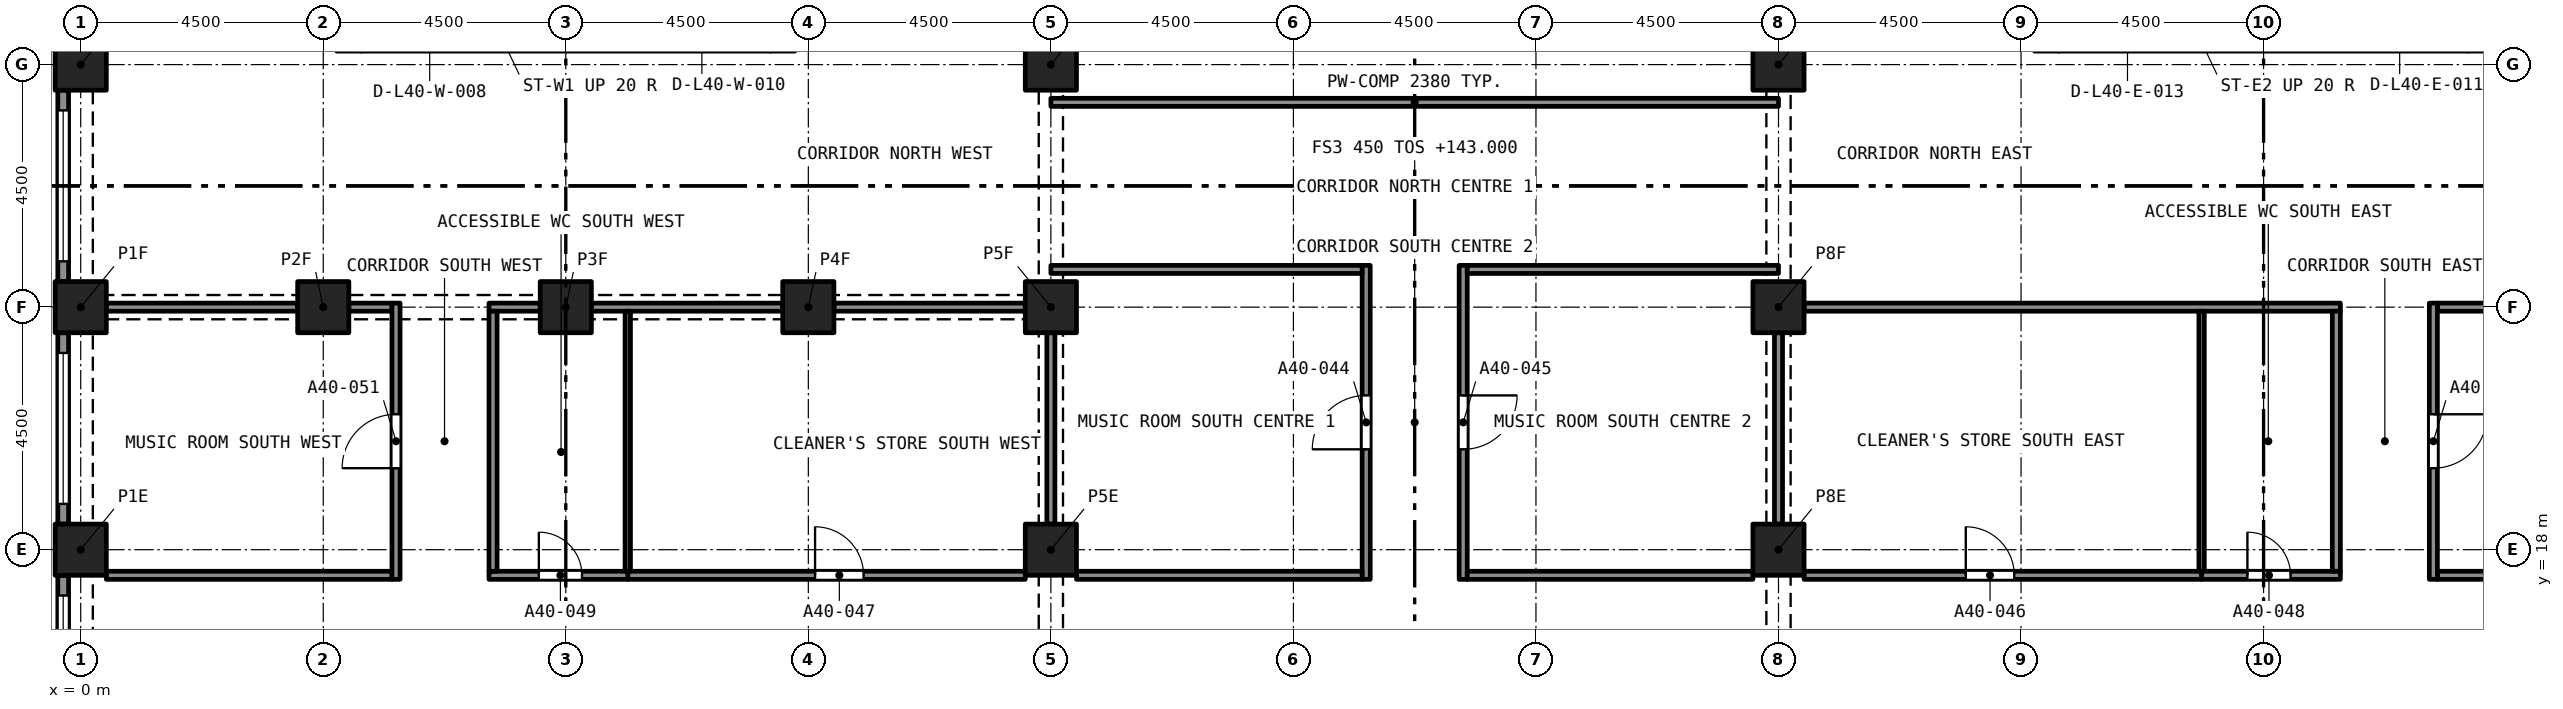
"""IFC4 building model, lengths in metres.
Left out: names, types, materials, properties, quantities, classifications, styles, units other than length and angle.
Written with IfcOpenShell. Run it as: python <this file> out.ifc"""

import sys

from ifc_helpers import new_model, si_unit, direction, frame, frame_2d, origin, origin_2d, place, context, subcontext, project, spatial, rectangle, extrude, element, fill, save


model = new_model("IFC4")
c1 = context("Model", 3, precision=1e-05, world=origin(), true_north=direction((0.0, 1.0)))
c2 = subcontext(c1, "Body", "Model", "MODEL_VIEW")
j1 = project(units=[si_unit("LENGTHUNIT", "METRE"), si_unit("PLANEANGLEUNIT", "RADIAN")], contexts=[c1])
p1 = place(None, origin())
s1 = spatial("IfcSite", under=j1, at=p1, CompositionType="ELEMENT")
p2 = place(p1, origin())
s2 = spatial("IfcBuilding", under=s1, at=p2, CompositionType="ELEMENT")
p3 = place(p2, frame((0.0, 0.0, 143.0)))
s3 = spatial("IfcBuildingStorey", under=s2, at=p3, CompositionType="ELEMENT", Elevation=143.0)
for number, where, z_axis, x_axis in (
    (1, (0.0, 18.0, 0.0), (0.0, 0.0, 1.0), (1.0, 0.0, 0.0)),
    (2, (18.0, 18.0, 0.0), (0.0, 0.0, 1.0), (1.0, 0.0, 0.0)),
    (3, (31.5, 18.0, 0.0), (0.0, 0.0, 1.0), (1.0, 0.0, 0.0)),
    (4, (0.0, 22.5, 0.0), (0.0, 0.0, 1.0), (1.0, 0.0, 0.0)),
    (5, (4.5, 22.5, 0.0), (0.0, 0.0, 1.0), (1.0, 0.0, 0.0)),
    (6, (9.0, 22.5, 0.0), (0.0, 0.0, 1.0), (1.0, 0.0, 0.0)),
    (7, (13.5, 22.5, 0.0), (0.0, 0.0, 1.0), (1.0, 0.0, 0.0)),
    (8, (18.0, 22.5, 0.0), (0.0, 0.0, 1.0), (1.0, 0.0, 0.0)),
    (9, (31.5, 22.5, 0.0), (0.0, 0.0, 1.0), (1.0, 0.0, 0.0)),
    (10, (0.0, 27.0, 0.0), (0.0, 0.0, 1.0), (1.0, 0.0, 0.0)),
    (11, (18.0, 27.0, 0.0), (0.0, 0.0, 1.0), (1.0, 0.0, 0.0)),
    (12, (31.5, 27.0, 0.0), (0.0, 0.0, 1.0), (1.0, 0.0, 0.0)),
):
    element("IfcColumn", number, at=place(p3, frame(where, z_axis=z_axis, x_axis=x_axis)), inside=s3, PredefinedType="COLUMN", context=c2, shape_type="SweptSolid", body=[
        extrude(rectangle(XDim=0.95, YDim=0.95, at=origin_2d()), origin(), (0.0, 0.0, 1.0), 3.2),
    ])
p4 = place(p3, frame((-0.325, 22.975, 0.0), z_axis=(0.0, 0.0, 1.0), x_axis=(0.0, 1.0, 0.0)))
e13 = element("IfcWall", 13, at=p4, inside=s3, PredefinedType="SOLIDWALL", context=c2, shape_type="SweptSolid", body=[
    extrude(rectangle(XDim=3.55, YDim=0.2, at=frame_2d((1.775, 0.0))), origin(), (0.0, 0.0, 1.0), 3.2),
])
p5 = place(p4, frame((0.375, 0.0, 0.45)))
e14 = element("IfcOpeningElement", 14, at=p5, cuts=e13, PredefinedType="OPENING", context=c2, shape_type="SweptSolid", body=[
    extrude(rectangle(XDim=2.8, YDim=1.95, at=frame_2d((1.4, 0.975))), frame((0.0, 0.11, 0.0), z_axis=(0.0, -1.0, 0.0), x_axis=(1.0, 0.0, 0.0)), (0.0, 0.0, 1.0), 0.22),
])
p6 = place(p3, frame((-0.325, 18.475, 0.0), z_axis=(0.0, 0.0, 1.0), x_axis=(0.0, 1.0, 0.0)))
e15 = element("IfcWall", 15, at=p6, inside=s3, PredefinedType="SOLIDWALL", context=c2, shape_type="SweptSolid", body=[
    extrude(rectangle(XDim=3.55, YDim=0.2, at=frame_2d((1.775, 0.0))), origin(), (0.0, 0.0, 1.0), 3.2),
])
p7 = place(p6, frame((0.375, 0.0, 0.45)))
e16 = element("IfcOpeningElement", 16, at=p7, cuts=e15, PredefinedType="OPENING", context=c2, shape_type="SweptSolid", body=[
    extrude(rectangle(XDim=2.8, YDim=1.95, at=frame_2d((1.4, 0.975))), frame((0.0, 0.11, 0.0), z_axis=(0.0, -1.0, 0.0), x_axis=(1.0, 0.0, 0.0)), (0.0, 0.0, 1.0), 0.22),
])
p8 = place(p3, frame((-0.325, 13.975, 0.0), z_axis=(0.0, 0.0, 1.0), x_axis=(0.0, 1.0, 0.0)))
e17 = element("IfcWall", 17, at=p8, inside=s3, PredefinedType="SOLIDWALL", context=c2, shape_type="SweptSolid", body=[
    extrude(rectangle(XDim=3.55, YDim=0.2, at=frame_2d((1.775, 0.0))), origin(), (0.0, 0.0, 1.0), 3.2),
])
p9 = place(p8, frame((0.375, 0.0, 0.45)))
e18 = element("IfcOpeningElement", 18, at=p9, cuts=e17, PredefinedType="OPENING", context=c2, shape_type="SweptSolid", body=[
    extrude(rectangle(XDim=2.8, YDim=1.95, at=frame_2d((1.4, 0.975))), frame((0.0, 0.11, 0.0), z_axis=(0.0, -1.0, 0.0), x_axis=(1.0, 0.0, 0.0)), (0.0, 0.0, 1.0), 0.22),
])
p10 = place(p3, frame((23.85, 17.45, 0.0), z_axis=(0.0, 0.0, 1.0), x_axis=(0.0, 1.0, 0.0)))
e19 = element("IfcWall", 19, at=p10, inside=s3, PredefinedType="PARTITIONING", context=c2, shape_type="SweptSolid", body=[
    extrude(rectangle(XDim=5.825, YDim=0.15, at=frame_2d((2.913, 0.0))), origin(), (0.0, 0.0, 1.0), 2.75),
])
p11 = place(p10, frame((2.413, 0.0, 0.0)))
e20 = element("IfcOpeningElement", 20, at=p11, cuts=e19, PredefinedType="OPENING", context=c2, shape_type="SweptSolid", body=[
    extrude(rectangle(XDim=1.0, YDim=2.1, at=frame_2d((0.5, 1.05))), frame((0.0, 0.085, 0.0), z_axis=(0.0, -1.0, 0.0), x_axis=(1.0, 0.0, 0.0)), (0.0, 0.0, 1.0), 0.17),
])
p12 = place(p3, frame((25.65, 23.275, 0.0), z_axis=(0.0, 0.0, 1.0), x_axis=(0.0, -1.0, 0.0)))
e21 = element("IfcWall", 21, at=p12, inside=s3, PredefinedType="PARTITIONING", context=c2, shape_type="SweptSolid", body=[
    extrude(rectangle(XDim=5.825, YDim=0.15, at=frame_2d((2.913, 0.0))), origin(), (0.0, 0.0, 1.0), 2.75),
])
p13 = place(p12, frame((2.413, 0.0, 0.0)))
e22 = element("IfcOpeningElement", 22, at=p13, cuts=e21, PredefinedType="OPENING", context=c2, shape_type="SweptSolid", body=[
    extrude(rectangle(XDim=1.0, YDim=2.1, at=frame_2d((0.5, 1.05))), frame((0.0, 0.085, 0.0), z_axis=(0.0, -1.0, 0.0), x_axis=(1.0, 0.0, 0.0)), (0.0, 0.0, 1.0), 0.17),
])
for number, where, z_axis, x_axis in (
    (23, (18.475, 17.525, 0.0), (0.0, 0.0, 1.0), (1.0, 0.0, 0.0)),
    (24, (25.725, 17.525, 0.0), (0.0, 0.0, 1.0), (1.0, 0.0, 0.0)),
):
    element("IfcWall", number, at=place(p3, frame(where, z_axis=z_axis, x_axis=x_axis)), inside=s3, PredefinedType="PARTITIONING", context=c2, shape_type="SweptSolid", body=[
        extrude(rectangle(XDim=5.3, YDim=0.15, at=frame_2d((2.65, 0.0))), origin(), (0.0, 0.0, 1.0), 2.75),
    ])
p14 = place(p3, frame((31.975, 17.525, 0.0), z_axis=(0.0, 0.0, 1.0), x_axis=(1.0, 0.0, 0.0)))
e25 = element("IfcWall", 25, at=p14, inside=s3, PredefinedType="PARTITIONING", context=c2, shape_type="SweptSolid", body=[
    extrude(rectangle(XDim=7.375, YDim=0.15, at=frame_2d((3.688, 0.0))), origin(), (0.0, 0.0, 1.0), 2.9),
])
p15 = place(p14, frame((3.0, 0.0, 0.0)))
e26 = element("IfcOpeningElement", 26, at=p15, cuts=e25, PredefinedType="OPENING", context=c2, shape_type="SweptSolid", body=[
    extrude(rectangle(XDim=0.9, YDim=2.1, at=frame_2d((0.45, 1.05))), frame((0.0, 0.085, 0.0), z_axis=(0.0, -1.0, 0.0), x_axis=(1.0, 0.0, 0.0)), (0.0, 0.0, 1.0), 0.17),
])
p16 = place(p3, frame((10.15, 17.525, 0.0), z_axis=(0.0, 0.0, 1.0), x_axis=(1.0, 0.0, 0.0)))
e27 = element("IfcWall", 27, at=p16, inside=s3, PredefinedType="PARTITIONING", context=c2, shape_type="SweptSolid", body=[
    extrude(rectangle(XDim=7.375, YDim=0.15, at=frame_2d((3.688, 0.0))), origin(), (0.0, 0.0, 1.0), 2.9),
])
p17 = place(p16, frame((3.475, 0.0, 0.0)))
e28 = element("IfcOpeningElement", 28, at=p17, cuts=e27, PredefinedType="OPENING", context=c2, shape_type="SweptSolid", body=[
    extrude(rectangle(XDim=0.9, YDim=2.1, at=frame_2d((0.45, 1.05))), frame((0.0, 0.085, 0.0), z_axis=(0.0, -1.0, 0.0), x_axis=(1.0, 0.0, 0.0)), (0.0, 0.0, 1.0), 0.17),
])
p18 = place(p3, frame((39.35, 17.525, 0.0), z_axis=(0.0, 0.0, 1.0), x_axis=(1.0, 0.0, 0.0)))
e29 = element("IfcWall", 29, at=p18, inside=s3, PredefinedType="PARTITIONING", context=c2, shape_type="SweptSolid", body=[
    extrude(rectangle(XDim=2.575, YDim=0.15, at=frame_2d((1.288, 0.0))), origin(), (0.0, 0.0, 1.0), 2.9),
])
p19 = place(p18, frame((0.85, 0.0, 0.0)))
e30 = element("IfcOpeningElement", 30, at=p19, cuts=e29, PredefinedType="OPENING", context=c2, shape_type="SweptSolid", body=[
    extrude(rectangle(XDim=0.8, YDim=2.1, at=frame_2d((0.4, 1.05))), frame((0.0, 0.085, 0.0), z_axis=(0.0, -1.0, 0.0), x_axis=(1.0, 0.0, 0.0)), (0.0, 0.0, 1.0), 0.17),
])
p20 = place(p3, frame((7.575, 17.525, 0.0), z_axis=(0.0, 0.0, 1.0), x_axis=(1.0, 0.0, 0.0)))
e31 = element("IfcWall", 31, at=p20, inside=s3, PredefinedType="PARTITIONING", context=c2, shape_type="SweptSolid", body=[
    extrude(rectangle(XDim=2.575, YDim=0.15, at=frame_2d((1.288, 0.0))), origin(), (0.0, 0.0, 1.0), 2.9),
])
p21 = place(p20, frame((0.925, 0.0, 0.0)))
e32 = element("IfcOpeningElement", 32, at=p21, cuts=e31, PredefinedType="OPENING", context=c2, shape_type="SweptSolid", body=[
    extrude(rectangle(XDim=0.8, YDim=2.1, at=frame_2d((0.4, 1.05))), frame((0.0, 0.085, 0.0), z_axis=(0.0, -1.0, 0.0), x_axis=(1.0, 0.0, 0.0)), (0.0, 0.0, 1.0), 0.17),
])
for number, where, z_axis, x_axis in (
    (33, (43.725, 17.525, 0.0), (0.0, 0.0, 1.0), (1.0, 0.0, 0.0)),
    (34, (0.475, 17.525, 0.0), (0.0, 0.0, 1.0), (1.0, 0.0, 0.0)),
):
    element("IfcWall", number, at=place(p3, frame(where, z_axis=z_axis, x_axis=x_axis)), inside=s3, PredefinedType="PARTITIONING", context=c2, shape_type="SweptSolid", body=[
        extrude(rectangle(XDim=5.3, YDim=0.15, at=frame_2d((2.65, 0.0))), origin(), (0.0, 0.0, 1.0), 2.9),
    ])
p22 = place(p3, frame((18.0, 26.3, 0.0), z_axis=(0.0, 0.0, 1.0), x_axis=(1.0, 0.0, 0.0)))
e35 = element("IfcWall", 35, at=p22, inside=s3, PredefinedType="PARTITIONING", context=c2, shape_type="SweptSolid", body=[
    extrude(rectangle(XDim=13.5, YDim=0.15, at=frame_2d((6.75, 0.0))), origin(), (0.0, 0.0, 1.0), 2.38),
])
p23 = place(p3, frame((18.0, 23.2, 0.0), z_axis=(0.0, 0.0, 1.0), x_axis=(1.0, 0.0, 0.0)))
e36 = element("IfcWall", 36, at=p23, inside=s3, PredefinedType="PARTITIONING", context=c2, shape_type="SweptSolid", body=[
    extrude(rectangle(XDim=5.775, YDim=0.15, at=frame_2d((2.887, 0.0))), origin(), (0.0, 0.0, 1.0), 2.75),
])
p24 = place(p3, frame((18.0, 18.475, 0.0), z_axis=(0.0, 0.0, 1.0), x_axis=(0.0, 1.0, 0.0)))
e37 = element("IfcWall", 37, at=p24, inside=s3, PredefinedType="PARTITIONING", context=c2, shape_type="SweptSolid", body=[
    extrude(rectangle(XDim=3.55, YDim=0.15, at=frame_2d((1.775, 0.0))), origin(), (0.0, 0.0, 1.0), 2.38),
])
p25 = place(p3, frame((25.725, 23.2, 0.0), z_axis=(0.0, 0.0, 1.0), x_axis=(1.0, 0.0, 0.0)))
e38 = element("IfcWall", 38, at=p25, inside=s3, PredefinedType="PARTITIONING", context=c2, shape_type="SweptSolid", body=[
    extrude(rectangle(XDim=5.775, YDim=0.15, at=frame_2d((2.887, 0.0))), origin(), (0.0, 0.0, 1.0), 2.75),
])
p26 = place(p3, frame((31.5, 18.475, 0.0), z_axis=(0.0, 0.0, 1.0), x_axis=(0.0, 1.0, 0.0)))
e39 = element("IfcWall", 39, at=p26, inside=s3, PredefinedType="PARTITIONING", context=c2, shape_type="SweptSolid", body=[
    extrude(rectangle(XDim=3.55, YDim=0.15, at=frame_2d((1.775, 0.0))), origin(), (0.0, 0.0, 1.0), 2.38),
])
p27 = place(p3, frame((31.975, 22.5, 0.0), z_axis=(0.0, 0.0, 1.0), x_axis=(1.0, 0.0, 0.0)))
e40 = element("IfcWall", 40, at=p27, inside=s3, PredefinedType="PARTITIONING", context=c2, shape_type="SweptSolid", body=[
    extrude(rectangle(XDim=9.95, YDim=0.15, at=frame_2d((4.975, 0.0))), origin(), (0.0, 0.0, 1.0), 2.9),
])
p28 = place(p3, frame((43.725, 22.5, 0.0), z_axis=(0.0, 0.0, 1.0), x_axis=(1.0, 0.0, 0.0)))
e41 = element("IfcWall", 41, at=p28, inside=s3, PredefinedType="PARTITIONING", context=c2, shape_type="SweptSolid", body=[
    extrude(rectangle(XDim=5.3, YDim=0.15, at=frame_2d((2.65, 0.0))), origin(), (0.0, 0.0, 1.0), 2.9),
])
for number, where, z_axis, x_axis in (
    (42, (13.975, 22.5, 0.0), (0.0, 0.0, 1.0), (1.0, 0.0, 0.0)),
    (43, (9.475, 22.5, 0.0), (0.0, 0.0, 1.0), (1.0, 0.0, 0.0)),
):
    element("IfcWall", number, at=place(p3, frame(where, z_axis=z_axis, x_axis=x_axis)), inside=s3, PredefinedType="PARTITIONING", context=c2, shape_type="SweptSolid", body=[
        extrude(rectangle(XDim=3.55, YDim=0.15, at=frame_2d((1.775, 0.0))), origin(), (0.0, 0.0, 1.0), 2.38),
    ])
p29 = place(p3, frame((7.575, 22.5, 0.0), z_axis=(0.0, 0.0, 1.0), x_axis=(1.0, 0.0, 0.0)))
e44 = element("IfcWall", 44, at=p29, inside=s3, PredefinedType="PARTITIONING", context=c2, shape_type="SweptSolid", body=[
    extrude(rectangle(XDim=0.95, YDim=0.15, at=frame_2d((0.475, 0.0))), origin(), (0.0, 0.0, 1.0), 2.38),
])
p30 = place(p3, frame((4.975, 22.5, 0.0), z_axis=(0.0, 0.0, 1.0), x_axis=(1.0, 0.0, 0.0)))
e45 = element("IfcWall", 45, at=p30, inside=s3, PredefinedType="PARTITIONING", context=c2, shape_type="SweptSolid", body=[
    extrude(rectangle(XDim=0.8, YDim=0.15, at=frame_2d((0.4, 0.0))), origin(), (0.0, 0.0, 1.0), 2.38),
])
p31 = place(p3, frame((0.475, 22.5, 0.0), z_axis=(0.0, 0.0, 1.0), x_axis=(1.0, 0.0, 0.0)))
e46 = element("IfcWall", 46, at=p31, inside=s3, PredefinedType="PARTITIONING", context=c2, shape_type="SweptSolid", body=[
    extrude(rectangle(XDim=3.55, YDim=0.15, at=frame_2d((1.775, 0.0))), origin(), (0.0, 0.0, 1.0), 2.38),
])
p32 = place(p3, frame((41.85, 17.6, 0.0), z_axis=(0.0, 0.0, 1.0), x_axis=(0.0, 1.0, 0.0)))
e47 = element("IfcWall", 47, at=p32, inside=s3, PredefinedType="PARTITIONING", context=c2, shape_type="SweptSolid", body=[
    extrude(rectangle(XDim=4.825, YDim=0.15, at=frame_2d((2.413, 0.0))), origin(), (0.0, 0.0, 1.0), 2.9),
])
p33 = place(p3, frame((43.65, 22.575, 0.0), z_axis=(0.0, 0.0, 1.0), x_axis=(0.0, -1.0, 0.0)))
e48 = element("IfcWall", 48, at=p33, inside=s3, PredefinedType="PARTITIONING", context=c2, shape_type="SweptSolid", body=[
    extrude(rectangle(XDim=5.125, YDim=0.15, at=frame_2d((2.562, 0.0))), origin(), (0.0, 0.0, 1.0), 2.9),
])
p34 = place(p33, frame((2.062, 0.0, 0.0)))
e49 = element("IfcOpeningElement", 49, at=p34, cuts=e48, PredefinedType="OPENING", context=c2, shape_type="SweptSolid", body=[
    extrude(rectangle(XDim=1.0, YDim=2.1, at=frame_2d((0.5, 1.05))), frame((0.0, 0.085, 0.0), z_axis=(0.0, -1.0, 0.0), x_axis=(1.0, 0.0, 0.0)), (0.0, 0.0, 1.0), 0.17),
])
p35 = place(p3, frame((7.65, 17.6, 0.0), z_axis=(0.0, 0.0, 1.0), x_axis=(0.0, 1.0, 0.0)))
e50 = element("IfcWall", 50, at=p35, inside=s3, PredefinedType="PARTITIONING", context=c2, shape_type="SweptSolid", body=[
    extrude(rectangle(XDim=4.825, YDim=0.15, at=frame_2d((2.413, 0.0))), origin(), (0.0, 0.0, 1.0), 2.9),
])
p36 = place(p3, frame((5.85, 17.45, 0.0), z_axis=(0.0, 0.0, 1.0), x_axis=(0.0, 1.0, 0.0)))
e51 = element("IfcWall", 51, at=p36, inside=s3, PredefinedType="PARTITIONING", context=c2, shape_type="SweptSolid", body=[
    extrude(rectangle(XDim=5.125, YDim=0.15, at=frame_2d((2.562, 0.0))), origin(), (0.0, 0.0, 1.0), 2.9),
])
p37 = place(p36, frame((2.062, 0.0, 0.0)))
e52 = element("IfcOpeningElement", 52, at=p37, cuts=e51, PredefinedType="OPENING", context=c2, shape_type="SweptSolid", body=[
    extrude(rectangle(XDim=1.0, YDim=2.1, at=frame_2d((0.5, 1.05))), frame((0.0, 0.085, 0.0), z_axis=(0.0, -1.0, 0.0), x_axis=(1.0, 0.0, 0.0)), (0.0, 0.0, 1.0), 0.17),
])
for number, where, z_axis, x_axis in (
    (53, (39.35, 17.6, 0.0), (0.0, 0.0, 1.0), (0.0, 1.0, 0.0)),
    (54, (10.15, 17.6, 0.0), (0.0, 0.0, 1.0), (0.0, 1.0, 0.0)),
):
    element("IfcWall", number, at=place(p3, frame(where, z_axis=z_axis, x_axis=x_axis)), inside=s3, PredefinedType="PARTITIONING", context=c2, shape_type="SweptSolid", body=[
        extrude(rectangle(XDim=4.825, YDim=0.1, at=frame_2d((2.413, 0.0))), origin(), (0.0, 0.0, 1.0), 2.9),
    ])
p38 = place(p5, origin())
e55 = element("IfcWindow", 55, at=p38, inside=s3, PartitioningType="SINGLE_PANEL", PredefinedType="WINDOW", context=c2, shape_type="SweptSolid", body=[
    extrude(rectangle(XDim=2.8, YDim=1.95, at=frame_2d((1.4, 0.975))), frame((0.0, 0.03, 0.0), z_axis=(0.0, -1.0, 0.0), x_axis=(1.0, 0.0, 0.0)), (0.0, 0.0, 1.0), 0.06),
])
fill(e14, e55)
p39 = place(p7, origin())
e56 = element("IfcWindow", 56, at=p39, inside=s3, PartitioningType="SINGLE_PANEL", PredefinedType="WINDOW", context=c2, shape_type="SweptSolid", body=[
    extrude(rectangle(XDim=2.8, YDim=1.95, at=frame_2d((1.4, 0.975))), frame((0.0, 0.03, 0.0), z_axis=(0.0, -1.0, 0.0), x_axis=(1.0, 0.0, 0.0)), (0.0, 0.0, 1.0), 0.06),
])
fill(e16, e56)
p40 = place(p9, origin())
e57 = element("IfcWindow", 57, at=p40, inside=s3, PartitioningType="SINGLE_PANEL", PredefinedType="WINDOW", context=c2, shape_type="SweptSolid", body=[
    extrude(rectangle(XDim=2.8, YDim=1.95, at=frame_2d((1.4, 0.975))), frame((0.0, 0.03, 0.0), z_axis=(0.0, -1.0, 0.0), x_axis=(1.0, 0.0, 0.0)), (0.0, 0.0, 1.0), 0.06),
])
fill(e18, e57)
p41 = place(p11, origin())
e58 = element("IfcDoor", 58, at=p41, inside=s3, OperationType="SINGLE_SWING_LEFT", PredefinedType="DOOR", context=c2, shape_type="SweptSolid", body=[
    extrude(rectangle(XDim=1.0, YDim=2.1, at=frame_2d((0.5, 1.05))), frame((0.0, 0.025, 0.0), z_axis=(0.0, -1.0, 0.0), x_axis=(1.0, 0.0, 0.0)), (0.0, 0.0, 1.0), 0.05),
])
fill(e20, e58)
p42 = place(p13, origin())
e59 = element("IfcDoor", 59, at=p42, inside=s3, OperationType="SINGLE_SWING_RIGHT", PredefinedType="DOOR", context=c2, shape_type="SweptSolid", body=[
    extrude(rectangle(XDim=1.0, YDim=2.1, at=frame_2d((0.5, 1.05))), frame((0.0, 0.025, 0.0), z_axis=(0.0, -1.0, 0.0), x_axis=(1.0, 0.0, 0.0)), (0.0, 0.0, 1.0), 0.05),
])
fill(e22, e59)
p43 = place(p15, origin())
e60 = element("IfcDoor", 60, at=p43, inside=s3, OperationType="SINGLE_SWING_LEFT", PredefinedType="DOOR", context=c2, shape_type="SweptSolid", body=[
    extrude(rectangle(XDim=0.9, YDim=2.1, at=frame_2d((0.45, 1.05))), frame((0.0, 0.025, 0.0), z_axis=(0.0, -1.0, 0.0), x_axis=(1.0, 0.0, 0.0)), (0.0, 0.0, 1.0), 0.05),
])
fill(e26, e60)
p44 = place(p17, origin())
e61 = element("IfcDoor", 61, at=p44, inside=s3, OperationType="SINGLE_SWING_RIGHT", PredefinedType="DOOR", context=c2, shape_type="SweptSolid", body=[
    extrude(rectangle(XDim=0.9, YDim=2.1, at=frame_2d((0.45, 1.05))), frame((0.0, 0.025, 0.0), z_axis=(0.0, -1.0, 0.0), x_axis=(1.0, 0.0, 0.0)), (0.0, 0.0, 1.0), 0.05),
])
fill(e28, e61)
p45 = place(p19, origin())
e62 = element("IfcDoor", 62, at=p45, inside=s3, OperationType="SINGLE_SWING_LEFT", PredefinedType="DOOR", context=c2, shape_type="SweptSolid", body=[
    extrude(rectangle(XDim=0.8, YDim=2.1, at=frame_2d((0.4, 1.05))), frame((0.0, 0.025, 0.0), z_axis=(0.0, -1.0, 0.0), x_axis=(1.0, 0.0, 0.0)), (0.0, 0.0, 1.0), 0.05),
])
fill(e30, e62)
p46 = place(p21, origin())
e63 = element("IfcDoor", 63, at=p46, inside=s3, OperationType="SINGLE_SWING_RIGHT", PredefinedType="DOOR", context=c2, shape_type="SweptSolid", body=[
    extrude(rectangle(XDim=0.8, YDim=2.1, at=frame_2d((0.4, 1.05))), frame((0.0, 0.025, 0.0), z_axis=(0.0, -1.0, 0.0), x_axis=(1.0, 0.0, 0.0)), (0.0, 0.0, 1.0), 0.05),
])
fill(e32, e63)
p47 = place(p34, origin())
e64 = element("IfcDoor", 64, at=p47, inside=s3, OperationType="SINGLE_SWING_RIGHT", PredefinedType="DOOR", context=c2, shape_type="SweptSolid", body=[
    extrude(rectangle(XDim=1.0, YDim=2.1, at=frame_2d((0.5, 1.05))), frame((0.0, 0.025, 0.0), z_axis=(0.0, -1.0, 0.0), x_axis=(1.0, 0.0, 0.0)), (0.0, 0.0, 1.0), 0.05),
])
fill(e49, e64)
p48 = place(p37, origin())
e65 = element("IfcDoor", 65, at=p48, inside=s3, OperationType="SINGLE_SWING_RIGHT", PredefinedType="DOOR", context=c2, shape_type="SweptSolid", body=[
    extrude(rectangle(XDim=1.0, YDim=2.1, at=frame_2d((0.5, 1.05))), frame((0.0, 0.025, 0.0), z_axis=(0.0, -1.0, 0.0), x_axis=(1.0, 0.0, 0.0)), (0.0, 0.0, 1.0), 0.05),
])
fill(e52, e65)
save(model, sys.argv[1])
